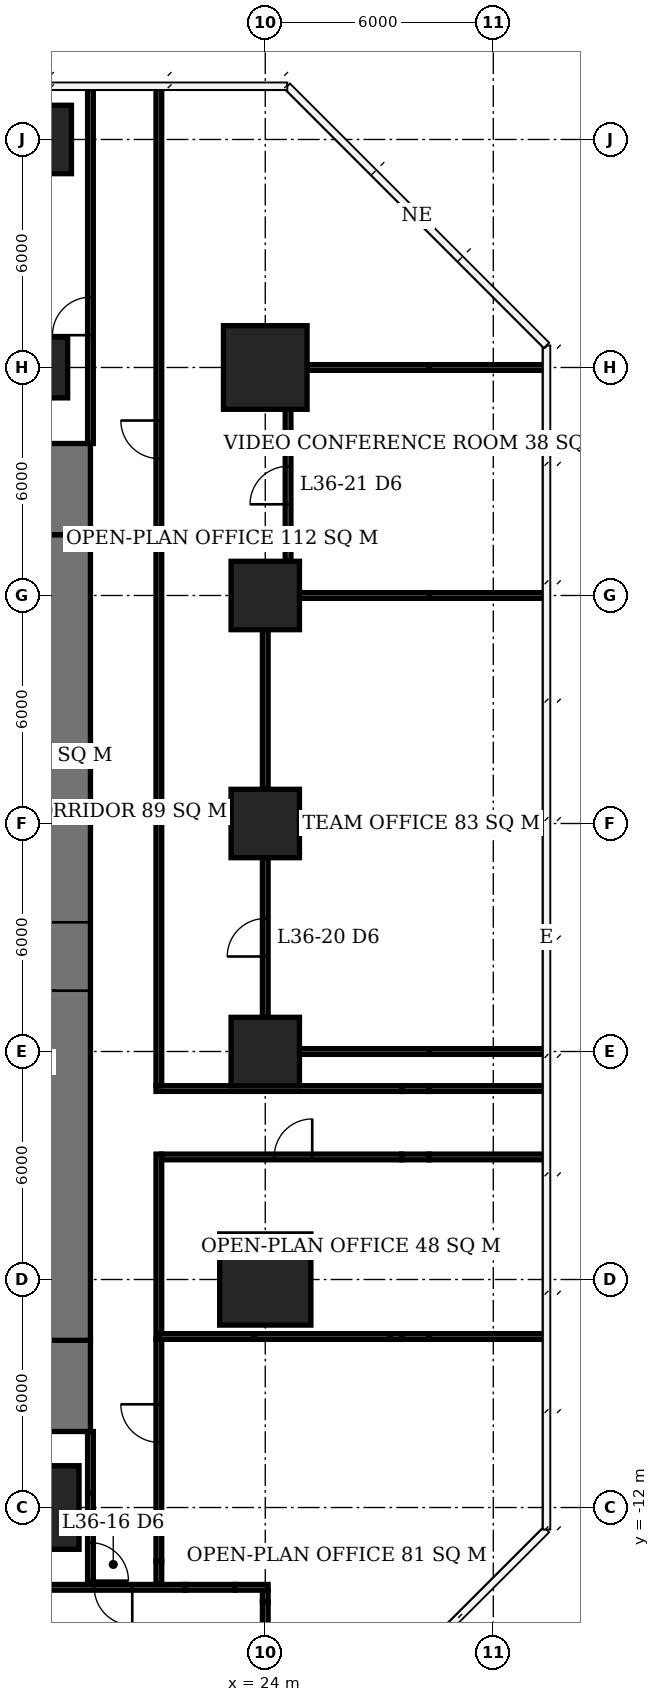
"""IFC4 building model, lengths in metres.
Left out: names, types, materials, properties, quantities, classifications, styles, units other than length and angle.
Written with IfcOpenShell. Run it as: python <this file> out.ifc"""

import sys

from ifc_helpers import new_model, si_unit, direction, frame, frame_2d, origin, origin_2d, place, context, subcontext, project, spatial, rectangle, extrude, element, fill, save


model = new_model("IFC4")
c1 = context("Model", 3, precision=1e-05, world=origin(), true_north=direction((0.0, 1.0)))
c2 = subcontext(c1, "Body", "Model", "MODEL_VIEW")
j1 = project(units=[si_unit("LENGTHUNIT", "METRE"), si_unit("PLANEANGLEUNIT", "RADIAN")], contexts=[c1])
p1 = place(None, origin())
s1 = spatial("IfcSite", under=j1, at=p1, CompositionType="ELEMENT")
p2 = place(p1, origin())
s2 = spatial("IfcBuilding", under=s1, at=p2, CompositionType="ELEMENT")
p3 = place(p2, frame((0.0, 0.0, 148.4)))
s3 = spatial("IfcBuildingStorey", under=s2, at=p3, CompositionType="ELEMENT", Elevation=148.4)
p4 = place(p3, frame((18.0, -12.0, 0.0), z_axis=(0.0, 0.0, 1.0), x_axis=(1.0, 0.0, 0.0)))
e1 = element("IfcColumn", 1, at=p4, inside=s3, PredefinedType="COLUMN", context=c2, shape_type="SweptSolid", body=[
    extrude(rectangle(XDim=2.2, YDim=2.2, at=origin_2d()), origin(), (0.0, 0.0, 1.0), 3.9),
])
p5 = place(p3, frame((18.0, 18.0, 0.0), z_axis=(0.0, 0.0, 1.0), x_axis=(1.0, 0.0, 0.0)))
e2 = element("IfcColumn", 2, at=p5, inside=s3, PredefinedType="COLUMN", context=c2, shape_type="SweptSolid", body=[
    extrude(rectangle(XDim=1.6, YDim=1.6, at=origin_2d()), origin(), (0.0, 0.0, 1.0), 3.9),
])
p6 = place(p3, frame((18.0, 24.0, 0.0), z_axis=(0.0, 0.0, 1.0), x_axis=(1.0, 0.0, 0.0)))
e3 = element("IfcColumn", 3, at=p6, inside=s3, PredefinedType="COLUMN", context=c2, shape_type="SweptSolid", body=[
    extrude(rectangle(XDim=1.8, YDim=1.8, at=origin_2d()), origin(), (0.0, 0.0, 1.0), 3.9),
])
p7 = place(p3, frame((24.0, -6.0, 0.0), z_axis=(0.0, 0.0, 1.0), x_axis=(1.0, 0.0, 0.0)))
e4 = element("IfcColumn", 4, at=p7, inside=s3, PredefinedType="COLUMN", context=c2, shape_type="SweptSolid", body=[
    extrude(rectangle(XDim=2.4, YDim=2.4, at=origin_2d()), origin(), (0.0, 0.0, 1.0), 3.9),
])
for number, where, z_axis, x_axis in (
    (5, (24.0, 0.0, 0.0), (0.0, 0.0, 1.0), (1.0, 0.0, 0.0)),
    (6, (24.0, 6.0, 0.0), (0.0, 0.0, 1.0), (1.0, 0.0, 0.0)),
    (7, (24.0, 12.0, 0.0), (0.0, 0.0, 1.0), (1.0, 0.0, 0.0)),
):
    element("IfcColumn", number, at=place(p3, frame(where, z_axis=z_axis, x_axis=x_axis)), inside=s3, PredefinedType="COLUMN", context=c2, shape_type="SweptSolid", body=[
        extrude(rectangle(XDim=1.8, YDim=1.8, at=origin_2d()), origin(), (0.0, 0.0, 1.0), 3.9),
    ])
p8 = place(p3, frame((24.0, 18.0, 0.0), z_axis=(0.0, 0.0, 1.0), x_axis=(1.0, 0.0, 0.0)))
e8 = element("IfcColumn", 8, at=p8, inside=s3, PredefinedType="COLUMN", context=c2, shape_type="SweptSolid", body=[
    extrude(rectangle(XDim=2.2, YDim=2.2, at=origin_2d()), origin(), (0.0, 0.0, 1.0), 3.9),
])
p9 = place(p3, frame((18.5, -7.6, 0.0), z_axis=(0.0, 0.0, 1.0), x_axis=(0.0, 1.0, 0.0)))
e9 = element("IfcWall", 9, at=p9, inside=s3, PredefinedType="SHEAR", context=c2, shape_type="SweptSolid", body=[
    extrude(rectangle(XDim=21.2, YDim=1.8, at=frame_2d((10.6, 0.0))), origin(), (0.0, 0.0, 1.0), 3.9),
])
p10 = place(p9, frame((9.2, 0.0, 0.0)))
e10 = element("IfcOpeningElement", 10, at=p10, cuts=e9, PredefinedType="OPENING", context=c2, shape_type="SweptSolid", body=[
    extrude(rectangle(XDim=1.8, YDim=2.4, at=frame_2d((0.9, 1.2))), frame((0.0, 0.91, 0.0), z_axis=(0.0, -1.0, 0.0), x_axis=(1.0, 0.0, 0.0)), (0.0, 0.0, 1.0), 1.82),
])
for number, where, z_axis, x_axis in (
    (11, (18.5, -10.0, 0.0), (0.0, 0.0, 1.0), (0.0, 1.0, 0.0)),
    (12, (18.5, 13.6, 0.0), (0.0, 0.0, 1.0), (0.0, 1.0, 0.0)),
):
    element("IfcWall", number, at=place(p3, frame(where, z_axis=z_axis, x_axis=x_axis)), inside=s3, PredefinedType="SHEAR", context=c2, shape_type="SweptSolid", body=[
        extrude(rectangle(XDim=2.4, YDim=1.8, at=frame_2d((1.2, 0.0))), origin(), (0.0, 0.0, 1.0), 3.9),
    ])
p11 = place(p3, frame((21.892, -14.1, 0.0), z_axis=(0.0, 0.0, 1.0), x_axis=(-1.0, 0.0, 0.0)))
e13 = element("IfcWall", 13, at=p11, inside=s3, PredefinedType="PARTITIONING", context=c2, shape_type="SweptSolid", body=[
    extrude(rectangle(XDim=3.817, YDim=0.15, at=frame_2d((1.909, 0.0))), origin(), (0.0, 0.0, 1.0), 2.65),
])
p12 = place(p11, frame((1.392, 0.0, 0.0)))
e14 = element("IfcOpeningElement", 14, at=p12, cuts=e13, PredefinedType="OPENING", context=c2, shape_type="SweptSolid", body=[
    extrude(rectangle(XDim=1.0, YDim=2.1, at=frame_2d((0.5, 1.05))), frame((0.0, 0.085, 0.0), z_axis=(0.0, -1.0, 0.0), x_axis=(1.0, 0.0, 0.0)), (0.0, 0.0, 1.0), 0.17),
])
p13 = place(p3, frame((21.892, -14.1, 0.0), z_axis=(0.0, 0.0, 1.0), x_axis=(1.0, 0.0, 0.0)))
e15 = element("IfcWall", 15, at=p13, inside=s3, PredefinedType="PARTITIONING", context=c2, shape_type="SweptSolid", body=[
    extrude(rectangle(XDim=1.318, YDim=0.15, at=frame_2d((0.659, 0.0))), origin(), (0.0, 0.0, 1.0), 3.65),
])
p14 = place(p3, frame((23.21, -14.1, 0.0), z_axis=(0.0, 0.0, 1.0), x_axis=(1.0, 0.0, 0.0)))
e16 = element("IfcWall", 16, at=p14, inside=s3, PredefinedType="PARTITIONING", context=c2, shape_type="SweptSolid", body=[
    extrude(rectangle(XDim=0.865, YDim=0.15, at=frame_2d((0.433, 0.0))), origin(), (0.0, 0.0, 1.0), 2.65),
])
p15 = place(p3, frame((24.9, 0.0, 0.0), z_axis=(0.0, 0.0, 1.0), x_axis=(1.0, 0.0, 0.0)))
e17 = element("IfcWall", 17, at=p15, inside=s3, PredefinedType="PARTITIONING", context=c2, shape_type="SweptSolid", body=[
    extrude(rectangle(XDim=3.41, YDim=0.15, at=frame_2d((1.705, 0.0))), origin(), (0.0, 0.0, 1.0), 2.65),
])
p16 = place(p3, frame((28.31, 0.0, 0.0), z_axis=(0.0, 0.0, 1.0), x_axis=(1.0, 0.0, 0.0)))
e18 = element("IfcWall", 18, at=p16, inside=s3, PredefinedType="PARTITIONING", context=c2, shape_type="SweptSolid", body=[
    extrude(rectangle(XDim=3.04, YDim=0.15, at=frame_2d((1.52, 0.0))), origin(), (0.0, 0.0, 1.0), 3.65),
])
p17 = place(p3, frame((24.9, 12.0, 0.0), z_axis=(0.0, 0.0, 1.0), x_axis=(1.0, 0.0, 0.0)))
e19 = element("IfcWall", 19, at=p17, inside=s3, PredefinedType="PARTITIONING", context=c2, shape_type="SweptSolid", body=[
    extrude(rectangle(XDim=3.41, YDim=0.15, at=frame_2d((1.705, 0.0))), origin(), (0.0, 0.0, 1.0), 2.65),
])
p18 = place(p3, frame((28.31, 12.0, 0.0), z_axis=(0.0, 0.0, 1.0), x_axis=(1.0, 0.0, 0.0)))
e20 = element("IfcWall", 20, at=p18, inside=s3, PredefinedType="PARTITIONING", context=c2, shape_type="SweptSolid", body=[
    extrude(rectangle(XDim=3.09, YDim=0.15, at=frame_2d((1.545, 0.0))), origin(), (0.0, 0.0, 1.0), 3.65),
])
p19 = place(p3, frame((25.1, 18.0, 0.0), z_axis=(0.0, 0.0, 1.0), x_axis=(1.0, 0.0, 0.0)))
e21 = element("IfcWall", 21, at=p19, inside=s3, PredefinedType="PARTITIONING", context=c2, shape_type="SweptSolid", body=[
    extrude(rectangle(XDim=3.21, YDim=0.15, at=frame_2d((1.605, 0.0))), origin(), (0.0, 0.0, 1.0), 2.65),
])
p20 = place(p3, frame((28.31, 18.0, 0.0), z_axis=(0.0, 0.0, 1.0), x_axis=(1.0, 0.0, 0.0)))
e22 = element("IfcWall", 22, at=p20, inside=s3, PredefinedType="PARTITIONING", context=c2, shape_type="SweptSolid", body=[
    extrude(rectangle(XDim=3.09, YDim=0.15, at=frame_2d((1.545, 0.0))), origin(), (0.0, 0.0, 1.0), 3.65),
])
p21 = place(p3, frame((24.0, -16.208, 0.0), z_axis=(0.0, 0.0, 1.0), x_axis=(0.0, 1.0, 0.0)))
e23 = element("IfcWall", 23, at=p21, inside=s3, PredefinedType="PARTITIONING", context=c2, shape_type="SweptSolid", body=[
    extrude(rectangle(XDim=1.718, YDim=0.15, at=frame_2d((0.859, 0.0))), origin(), (0.0, 0.0, 1.0), 3.65),
])
p22 = place(p3, frame((24.0, -14.49, 0.0), z_axis=(0.0, 0.0, 1.0), x_axis=(0.0, 1.0, 0.0)))
e24 = element("IfcWall", 24, at=p22, inside=s3, PredefinedType="PARTITIONING", context=c2, shape_type="SweptSolid", body=[
    extrude(rectangle(XDim=0.315, YDim=0.15, at=frame_2d((0.157, 0.0))), origin(), (0.0, 0.0, 1.0), 2.65),
])
p23 = place(p3, frame((24.0, 0.9, 0.0), z_axis=(0.0, 0.0, 1.0), x_axis=(0.0, 1.0, 0.0)))
e25 = element("IfcWall", 25, at=p23, inside=s3, PredefinedType="PARTITIONING", context=c2, shape_type="SweptSolid", body=[
    extrude(rectangle(XDim=4.2, YDim=0.15, at=frame_2d((2.1, 0.0))), origin(), (0.0, 0.0, 1.0), 3.65),
])
p24 = place(p23, frame((1.6, 0.0, 0.0)))
e26 = element("IfcOpeningElement", 26, at=p24, cuts=e25, PredefinedType="OPENING", context=c2, shape_type="SweptSolid", body=[
    extrude(rectangle(XDim=1.0, YDim=2.1, at=frame_2d((0.5, 1.05))), frame((0.0, 0.085, 0.0), z_axis=(0.0, -1.0, 0.0), x_axis=(1.0, 0.0, 0.0)), (0.0, 0.0, 1.0), 0.17),
])
p25 = place(p3, frame((24.0, 6.9, 0.0), z_axis=(0.0, 0.0, 1.0), x_axis=(0.0, 1.0, 0.0)))
e27 = element("IfcWall", 27, at=p25, inside=s3, PredefinedType="PARTITIONING", context=c2, shape_type="SweptSolid", body=[
    extrude(rectangle(XDim=4.2, YDim=0.15, at=frame_2d((2.1, 0.0))), origin(), (0.0, 0.0, 1.0), 3.65),
])
p26 = place(p3, frame((24.6, 12.9, 0.0), z_axis=(0.0, 0.0, 1.0), x_axis=(0.0, 1.0, 0.0)))
e28 = element("IfcWall", 28, at=p26, inside=s3, PredefinedType="PARTITIONING", context=c2, shape_type="SweptSolid", body=[
    extrude(rectangle(XDim=4.0, YDim=0.15, at=frame_2d((2.0, 0.0))), origin(), (0.0, 0.0, 1.0), 3.65),
])
p27 = place(p26, frame((1.5, 0.0, 0.0)))
e29 = element("IfcOpeningElement", 29, at=p27, cuts=e28, PredefinedType="OPENING", context=c2, shape_type="SweptSolid", body=[
    extrude(rectangle(XDim=1.0, YDim=2.1, at=frame_2d((0.5, 1.05))), frame((0.0, 0.085, 0.0), z_axis=(0.0, -1.0, 0.0), x_axis=(1.0, 0.0, 0.0)), (0.0, 0.0, 1.0), 0.17),
])
p28 = place(p3, frame((19.4, -11.608, 0.0), z_axis=(0.0, 0.0, 1.0), x_axis=(0.0, -1.0, 0.0)))
e30 = element("IfcWall", 30, at=p28, inside=s3, PredefinedType="PARTITIONING", context=c2, shape_type="SweptSolid", body=[
    extrude(rectangle(XDim=2.417, YDim=0.15, at=frame_2d((1.208, 0.0))), origin(), (0.0, 0.0, 1.0), 2.65),
])
p29 = place(p28, frame((1.317, 0.0, 0.0)))
e31 = element("IfcOpeningElement", 31, at=p29, cuts=e30, PredefinedType="OPENING", context=c2, shape_type="SweptSolid", body=[
    extrude(rectangle(XDim=1.0, YDim=2.1, at=frame_2d((0.5, 1.05))), frame((0.0, 0.085, 0.0), z_axis=(0.0, -1.0, 0.0), x_axis=(1.0, 0.0, 0.0)), (0.0, 0.0, 1.0), 0.17),
])
p30 = place(p3, frame((19.4, -11.608, 0.0), z_axis=(0.0, 0.0, 1.0), x_axis=(0.0, 1.0, 0.0)))
e32 = element("IfcWall", 32, at=p30, inside=s3, PredefinedType="PARTITIONING", context=c2, shape_type="SweptSolid", body=[
    extrude(rectangle(XDim=1.608, YDim=0.15, at=frame_2d((0.804, 0.0))), origin(), (0.0, 0.0, 1.0), 3.65),
])
p31 = place(p3, frame((19.4, 16.0, 0.0), z_axis=(0.0, 0.0, 1.0), x_axis=(0.0, 1.0, 0.0)))
e33 = element("IfcWall", 33, at=p31, inside=s3, PredefinedType="PARTITIONING", context=c2, shape_type="SweptSolid", body=[
    extrude(rectangle(XDim=9.4, YDim=0.15, at=frame_2d((4.7, 0.0))), origin(), (0.0, 0.0, 1.0), 3.65),
])
p32 = place(p31, frame((2.85, 0.0, 0.0)))
e34 = element("IfcOpeningElement", 34, at=p32, cuts=e33, PredefinedType="OPENING", context=c2, shape_type="SweptSolid", body=[
    extrude(rectangle(XDim=1.0, YDim=2.1, at=frame_2d((0.5, 1.05))), frame((0.0, 0.085, 0.0), z_axis=(0.0, -1.0, 0.0), x_axis=(1.0, 0.0, 0.0)), (0.0, 0.0, 1.0), 0.17),
])
p33 = place(p3, frame((21.2, -14.025, 0.0), z_axis=(0.0, 0.0, 1.0), x_axis=(0.0, 1.0, 0.0)))
e35 = element("IfcWall", 35, at=p33, inside=s3, PredefinedType="PARTITIONING", context=c2, shape_type="SweptSolid", body=[
    extrude(rectangle(XDim=0.617, YDim=0.15, at=frame_2d((0.309, 0.0))), origin(), (0.0, 0.0, 1.0), 2.65),
])
p34 = place(p3, frame((21.2, -13.408, 0.0), z_axis=(0.0, 0.0, 1.0), x_axis=(0.0, 1.0, 0.0)))
e36 = element("IfcWall", 36, at=p34, inside=s3, PredefinedType="PARTITIONING", context=c2, shape_type="SweptSolid", body=[
    extrude(rectangle(XDim=5.833, YDim=0.15, at=frame_2d((2.917, 0.0))), origin(), (0.0, 0.0, 1.0), 3.65),
])
p35 = place(p34, frame((3.124, 0.0, 0.0)))
e37 = element("IfcOpeningElement", 37, at=p35, cuts=e36, PredefinedType="OPENING", context=c2, shape_type="SweptSolid", body=[
    extrude(rectangle(XDim=1.0, YDim=2.1, at=frame_2d((0.5, 1.05))), frame((0.0, 0.085, 0.0), z_axis=(0.0, -1.0, 0.0), x_axis=(1.0, 0.0, 0.0)), (0.0, 0.0, 1.0), 0.17),
])
p36 = place(p3, frame((21.2, -7.575, 0.0), z_axis=(0.0, 0.0, 1.0), x_axis=(0.0, 1.0, 0.0)))
e38 = element("IfcWall", 38, at=p36, inside=s3, PredefinedType="PARTITIONING", context=c2, shape_type="SweptSolid", body=[
    extrude(rectangle(XDim=4.875, YDim=0.15, at=frame_2d((2.438, 0.0))), origin(), (0.0, 0.0, 1.0), 3.65),
])
p37 = place(p3, frame((21.2, -7.5, 0.0), z_axis=(0.0, 0.0, 1.0), x_axis=(1.0, 0.0, 0.0)))
e39 = element("IfcWall", 39, at=p37, inside=s3, PredefinedType="PARTITIONING", context=c2, shape_type="SweptSolid", body=[
    extrude(rectangle(XDim=2.508, YDim=0.15, at=frame_2d((1.254, 0.0))), origin(), (0.0, 0.0, 1.0), 3.65),
])
p38 = place(p3, frame((23.708, -7.5, 0.0), z_axis=(0.0, 0.0, 1.0), x_axis=(1.0, 0.0, 0.0)))
e40 = element("IfcWall", 40, at=p38, inside=s3, PredefinedType="PARTITIONING", context=c2, shape_type="SweptSolid", body=[
    extrude(rectangle(XDim=3.584, YDim=0.15, at=frame_2d((1.792, 0.0))), origin(), (0.0, 0.0, 1.0), 2.65),
])
p39 = place(p3, frame((27.292, -7.5, 0.0), z_axis=(0.0, 0.0, 1.0), x_axis=(1.0, 0.0, 0.0)))
e41 = element("IfcWall", 41, at=p39, inside=s3, PredefinedType="PARTITIONING", context=c2, shape_type="SweptSolid", body=[
    extrude(rectangle(XDim=0.298, YDim=0.15, at=frame_2d((0.149, 0.0))), origin(), (0.0, 0.0, 1.0), 3.65),
])
p40 = place(p3, frame((27.59, -7.5, 0.0), z_axis=(0.0, 0.0, 1.0), x_axis=(1.0, 0.0, 0.0)))
e42 = element("IfcWall", 42, at=p40, inside=s3, PredefinedType="PARTITIONING", context=c2, shape_type="SweptSolid", body=[
    extrude(rectangle(XDim=0.72, YDim=0.15, at=frame_2d((0.36, 0.0))), origin(), (0.0, 0.0, 1.0), 2.65),
])
p41 = place(p3, frame((28.31, -7.5, 0.0), z_axis=(0.0, 0.0, 1.0), x_axis=(1.0, 0.0, 0.0)))
e43 = element("IfcWall", 43, at=p41, inside=s3, PredefinedType="PARTITIONING", context=c2, shape_type="SweptSolid", body=[
    extrude(rectangle(XDim=3.09, YDim=0.15, at=frame_2d((1.545, 0.0))), origin(), (0.0, 0.0, 1.0), 3.65),
])
p42 = place(p3, frame((21.275, -2.775, 0.0), z_axis=(0.0, 0.0, 1.0), x_axis=(1.0, 0.0, 0.0)))
e44 = element("IfcWall", 44, at=p42, inside=s3, PredefinedType="PARTITIONING", context=c2, shape_type="SweptSolid", body=[
    extrude(rectangle(XDim=6.315, YDim=0.15, at=frame_2d((3.158, 0.0))), origin(), (0.0, 0.0, 1.0), 3.65),
])
p43 = place(p42, frame((2.96, 0.0, 0.0)))
e45 = element("IfcOpeningElement", 45, at=p43, cuts=e44, PredefinedType="OPENING", context=c2, shape_type="SweptSolid", body=[
    extrude(rectangle(XDim=1.0, YDim=2.1, at=frame_2d((0.5, 1.05))), frame((0.0, 0.085, 0.0), z_axis=(0.0, -1.0, 0.0), x_axis=(1.0, 0.0, 0.0)), (0.0, 0.0, 1.0), 0.17),
])
p44 = place(p3, frame((27.59, -2.775, 0.0), z_axis=(0.0, 0.0, 1.0), x_axis=(1.0, 0.0, 0.0)))
e46 = element("IfcWall", 46, at=p44, inside=s3, PredefinedType="PARTITIONING", context=c2, shape_type="SweptSolid", body=[
    extrude(rectangle(XDim=0.72, YDim=0.15, at=frame_2d((0.36, 0.0))), origin(), (0.0, 0.0, 1.0), 2.65),
])
p45 = place(p3, frame((28.31, -2.775, 0.0), z_axis=(0.0, 0.0, 1.0), x_axis=(1.0, 0.0, 0.0)))
e47 = element("IfcWall", 47, at=p45, inside=s3, PredefinedType="PARTITIONING", context=c2, shape_type="SweptSolid", body=[
    extrude(rectangle(XDim=3.09, YDim=0.15, at=frame_2d((1.545, 0.0))), origin(), (0.0, 0.0, 1.0), 3.65),
])
p46 = place(p3, frame((21.2, -0.9, 0.0), z_axis=(0.0, 0.0, 1.0), x_axis=(0.0, 1.0, 0.0)))
e48 = element("IfcWall", 48, at=p46, inside=s3, PredefinedType="PARTITIONING", context=c2, shape_type="SweptSolid", body=[
    extrude(rectangle(XDim=26.3, YDim=0.15, at=frame_2d((13.15, 0.0))), origin(), (0.0, 0.0, 1.0), 3.65),
])
p47 = place(p46, frame((16.504, 0.0, 0.0)))
e49 = element("IfcOpeningElement", 49, at=p47, cuts=e48, PredefinedType="OPENING", context=c2, shape_type="SweptSolid", body=[
    extrude(rectangle(XDim=1.0, YDim=2.1, at=frame_2d((0.5, 1.05))), frame((0.0, 0.085, 0.0), z_axis=(0.0, -1.0, 0.0), x_axis=(1.0, 0.0, 0.0)), (0.0, 0.0, 1.0), 0.17),
])
p48 = place(p3, frame((21.125, -0.975, 0.0), z_axis=(0.0, 0.0, 1.0), x_axis=(1.0, 0.0, 0.0)))
e50 = element("IfcWall", 50, at=p48, inside=s3, PredefinedType="PARTITIONING", context=c2, shape_type="SweptSolid", body=[
    extrude(rectangle(XDim=6.465, YDim=0.15, at=frame_2d((3.232, 0.0))), origin(), (0.0, 0.0, 1.0), 3.65),
])
p49 = place(p3, frame((27.59, -0.975, 0.0), z_axis=(0.0, 0.0, 1.0), x_axis=(1.0, 0.0, 0.0)))
e51 = element("IfcWall", 51, at=p49, inside=s3, PredefinedType="PARTITIONING", context=c2, shape_type="SweptSolid", body=[
    extrude(rectangle(XDim=0.72, YDim=0.15, at=frame_2d((0.36, 0.0))), origin(), (0.0, 0.0, 1.0), 2.65),
])
p50 = place(p3, frame((28.31, -0.975, 0.0), z_axis=(0.0, 0.0, 1.0), x_axis=(1.0, 0.0, 0.0)))
e52 = element("IfcWall", 52, at=p50, inside=s3, PredefinedType="PARTITIONING", context=c2, shape_type="SweptSolid", body=[
    extrude(rectangle(XDim=3.09, YDim=0.15, at=frame_2d((1.545, 0.0))), origin(), (0.0, 0.0, 1.0), 3.65),
])
p51 = place(p10, origin())
e53 = element("IfcDoor", 53, at=p51, inside=s3, OperationType="DOUBLE_DOOR_SINGLE_SWING", PredefinedType="DOOR", context=c2, shape_type="SweptSolid", body=[
    extrude(rectangle(XDim=1.8, YDim=2.4, at=frame_2d((0.9, 1.2))), frame((0.0, 0.025, 0.0), z_axis=(0.0, -1.0, 0.0), x_axis=(1.0, 0.0, 0.0)), (0.0, 0.0, 1.0), 0.05),
])
fill(e10, e53)
p52 = place(p12, origin())
e54 = element("IfcDoor", 54, at=p52, inside=s3, OperationType="SINGLE_SWING_LEFT", PredefinedType="DOOR", context=c2, shape_type="SweptSolid", body=[
    extrude(rectangle(XDim=1.0, YDim=2.1, at=frame_2d((0.5, 1.05))), frame((0.0, 0.025, 0.0), z_axis=(0.0, -1.0, 0.0), x_axis=(1.0, 0.0, 0.0)), (0.0, 0.0, 1.0), 0.05),
])
fill(e14, e54)
p53 = place(p24, origin())
e55 = element("IfcDoor", 55, at=p53, inside=s3, OperationType="SINGLE_SWING_LEFT", PredefinedType="DOOR", context=c2, shape_type="SweptSolid", body=[
    extrude(rectangle(XDim=1.0, YDim=2.1, at=frame_2d((0.5, 1.05))), frame((0.0, 0.025, 0.0), z_axis=(0.0, -1.0, 0.0), x_axis=(1.0, 0.0, 0.0)), (0.0, 0.0, 1.0), 0.05),
])
fill(e26, e55)
p54 = place(p27, origin())
e56 = element("IfcDoor", 56, at=p54, inside=s3, OperationType="SINGLE_SWING_LEFT", PredefinedType="DOOR", context=c2, shape_type="SweptSolid", body=[
    extrude(rectangle(XDim=1.0, YDim=2.1, at=frame_2d((0.5, 1.05))), frame((0.0, 0.025, 0.0), z_axis=(0.0, -1.0, 0.0), x_axis=(1.0, 0.0, 0.0)), (0.0, 0.0, 1.0), 0.05),
])
fill(e29, e56)
p55 = place(p35, origin())
e57 = element("IfcDoor", 57, at=p55, inside=s3, OperationType="SINGLE_SWING_RIGHT", PredefinedType="DOOR", context=c2, shape_type="SweptSolid", body=[
    extrude(rectangle(XDim=1.0, YDim=2.1, at=frame_2d((0.5, 1.05))), frame((0.0, 0.025, 0.0), z_axis=(0.0, -1.0, 0.0), x_axis=(1.0, 0.0, 0.0)), (0.0, 0.0, 1.0), 0.05),
])
fill(e37, e57)
p56 = place(p43, origin())
e58 = element("IfcDoor", 58, at=p56, inside=s3, OperationType="SINGLE_SWING_RIGHT", PredefinedType="DOOR", context=c2, shape_type="SweptSolid", body=[
    extrude(rectangle(XDim=1.0, YDim=2.1, at=frame_2d((0.5, 1.05))), frame((0.0, 0.025, 0.0), z_axis=(0.0, -1.0, 0.0), x_axis=(1.0, 0.0, 0.0)), (0.0, 0.0, 1.0), 0.05),
])
fill(e45, e58)
p57 = place(p47, origin())
e59 = element("IfcDoor", 59, at=p57, inside=s3, OperationType="SINGLE_SWING_RIGHT", PredefinedType="DOOR", context=c2, shape_type="SweptSolid", body=[
    extrude(rectangle(XDim=1.0, YDim=2.1, at=frame_2d((0.5, 1.05))), frame((0.0, 0.025, 0.0), z_axis=(0.0, -1.0, 0.0), x_axis=(1.0, 0.0, 0.0)), (0.0, 0.0, 1.0), 0.05),
])
fill(e49, e59)
p58 = place(p32, origin())
e60 = element("IfcDoor", 60, at=p58, inside=s3, OperationType="SINGLE_SWING_LEFT", PredefinedType="DOOR", context=c2, shape_type="SweptSolid", body=[
    extrude(rectangle(XDim=1.0, YDim=2.1, at=frame_2d((0.5, 1.05))), frame((0.0, 0.025, 0.0), z_axis=(0.0, -1.0, 0.0), x_axis=(1.0, 0.0, 0.0)), (0.0, 0.0, 1.0), 0.05),
])
fill(e34, e60)
p59 = place(p29, origin())
e61 = element("IfcDoor", 61, at=p59, inside=s3, OperationType="SINGLE_SWING_RIGHT", PredefinedType="DOOR", context=c2, shape_type="SweptSolid", body=[
    extrude(rectangle(XDim=1.0, YDim=2.1, at=frame_2d((0.5, 1.05))), frame((0.0, 0.025, 0.0), z_axis=(0.0, -1.0, 0.0), x_axis=(1.0, 0.0, 0.0)), (0.0, 0.0, 1.0), 0.05),
])
fill(e31, e61)
save(model, sys.argv[1])
